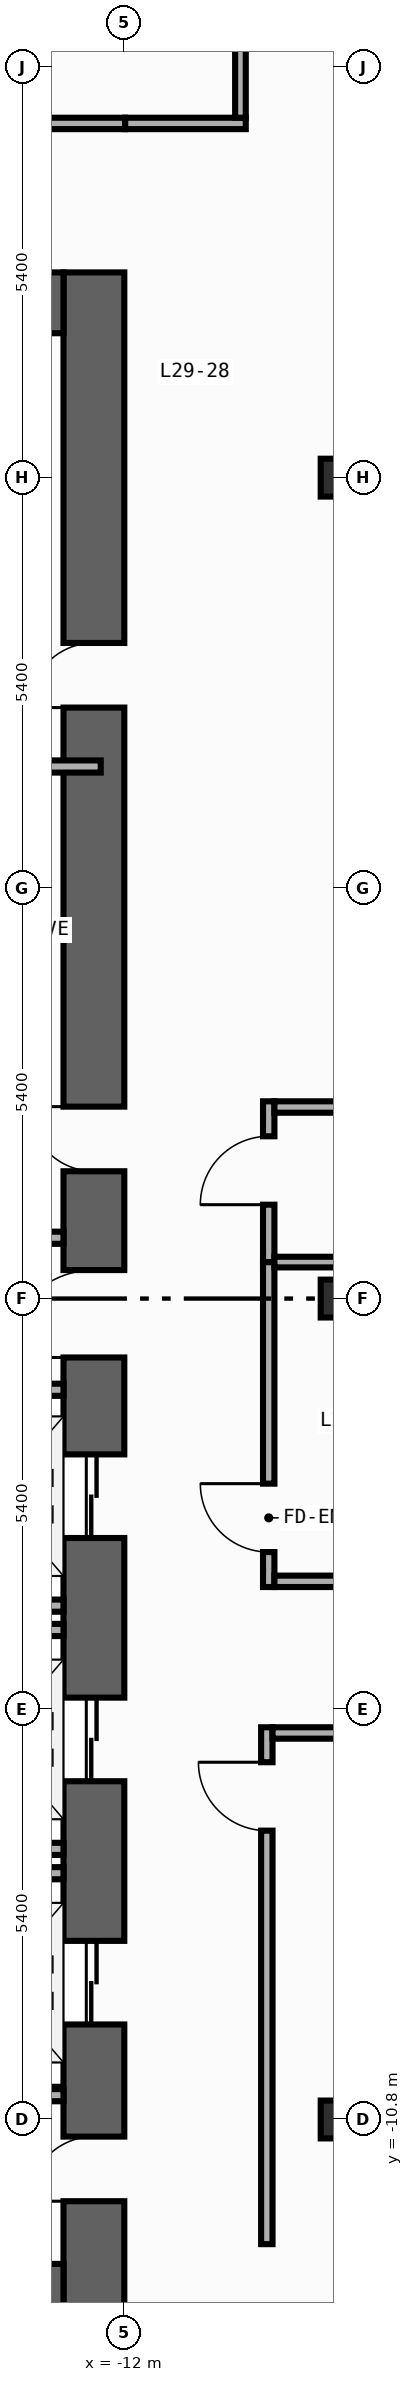
"""IFC4 building model, lengths in metres.
Left out: names, types, materials, properties, quantities, classifications, styles, units other than length and angle.
Written with IfcOpenShell. Run it as: python <this file> out.ifc"""

import sys

from ifc_helpers import new_model, si_unit, direction, frame, frame_2d, origin, origin_2d, place, context, subcontext, project, spatial, rectangle, i_section, extrude, element, fill, save


model = new_model("IFC4")
c1 = context("Model", 3, precision=1e-05, world=origin(), true_north=direction((0.0, 1.0)))
c2 = subcontext(c1, "Body", "Model", "MODEL_VIEW")
j1 = project(units=[si_unit("LENGTHUNIT", "METRE"), si_unit("PLANEANGLEUNIT", "RADIAN")], contexts=[c1])
p1 = place(None, origin())
s1 = spatial("IfcSite", under=j1, at=p1, CompositionType="ELEMENT")
p2 = place(p1, origin())
s2 = spatial("IfcBuilding", under=s1, at=p2, CompositionType="ELEMENT")
p3 = place(p2, frame((0.0, 0.0, 126.8)))
s3 = spatial("IfcBuildingStorey", under=s2, at=p3, CompositionType="ELEMENT", Elevation=126.8)
p4 = place(p3, frame((-12.4, -13.5, 0.0), z_axis=(0.0, 0.0, 1.0), x_axis=(0.0, 1.0, 0.0)))
e1 = element("IfcWall", 1, at=p4, inside=s3, PredefinedType="SHEAR", context=c2, shape_type="SweptSolid", body=[
    extrude(rectangle(XDim=27.0, YDim=0.8, at=frame_2d((13.5, 0.0))), origin(), (0.0, 0.0, 1.0), 3.94),
])
p5 = place(p4, frame((10.35, 0.0, 0.0)))
e2 = element("IfcOpeningElement", 2, at=p5, cuts=e1, PredefinedType="OPENING", context=c2, shape_type="SweptSolid", body=[
    extrude(rectangle(XDim=1.1, YDim=2.2, at=frame_2d((0.55, 1.1))), frame((0.0, 0.41, 0.0), z_axis=(0.0, -1.0, 0.0), x_axis=(1.0, 0.0, 0.0)), (0.0, 0.0, 1.0), 0.82),
])
p6 = place(p4, frame((7.15, 0.0, 0.0)))
e3 = element("IfcOpeningElement", 3, at=p6, cuts=e1, PredefinedType="OPENING", context=c2, shape_type="SweptSolid", body=[
    extrude(rectangle(XDim=1.1, YDim=2.2, at=frame_2d((0.55, 1.1))), frame((0.0, 0.41, 0.0), z_axis=(0.0, -1.0, 0.0), x_axis=(1.0, 0.0, 0.0)), (0.0, 0.0, 1.0), 0.82),
])
p7 = place(p4, frame((3.95, 0.0, 0.0)))
e4 = element("IfcOpeningElement", 4, at=p7, cuts=e1, PredefinedType="OPENING", context=c2, shape_type="SweptSolid", body=[
    extrude(rectangle(XDim=1.1, YDim=2.2, at=frame_2d((0.55, 1.1))), frame((0.0, 0.41, 0.0), z_axis=(0.0, -1.0, 0.0), x_axis=(1.0, 0.0, 0.0)), (0.0, 0.0, 1.0), 0.82),
])
p8 = place(p4, frame((15.175, 0.0, 0.0)))
e5 = element("IfcOpeningElement", 5, at=p8, cuts=e1, PredefinedType="OPENING", context=c2, shape_type="SweptSolid", body=[
    extrude(rectangle(XDim=0.85, YDim=2.1, at=frame_2d((0.425, 1.05))), frame((0.0, 0.41, 0.0), z_axis=(0.0, -1.0, 0.0), x_axis=(1.0, 0.0, 0.0)), (0.0, 0.0, 1.0), 0.82),
])
p9 = place(p4, frame((21.275, 0.0, 0.0)))
e6 = element("IfcOpeningElement", 6, at=p9, cuts=e1, PredefinedType="OPENING", context=c2, shape_type="SweptSolid", body=[
    extrude(rectangle(XDim=0.85, YDim=2.1, at=frame_2d((0.425, 1.05))), frame((0.0, 0.41, 0.0), z_axis=(0.0, -1.0, 0.0), x_axis=(1.0, 0.0, 0.0)), (0.0, 0.0, 1.0), 0.82),
])
p10 = place(p4, frame((12.725, 0.0, 0.0)))
e7 = element("IfcOpeningElement", 7, at=p10, cuts=e1, PredefinedType="OPENING", context=c2, shape_type="SweptSolid", body=[
    extrude(rectangle(XDim=1.15, YDim=2.2, at=frame_2d((0.575, 1.1))), frame((0.0, 0.41, 0.0), z_axis=(0.0, -1.0, 0.0), x_axis=(1.0, 0.0, 0.0)), (0.0, 0.0, 1.0), 0.82),
])
p11 = place(p4, frame((1.625, 0.0, 0.0)))
e8 = element("IfcOpeningElement", 8, at=p11, cuts=e1, PredefinedType="OPENING", context=c2, shape_type="SweptSolid", body=[
    extrude(rectangle(XDim=0.85, YDim=2.1, at=frame_2d((0.425, 1.05))), frame((0.0, 0.41, 0.0), z_axis=(0.0, -1.0, 0.0), x_axis=(1.0, 0.0, 0.0)), (0.0, 0.0, 1.0), 0.82),
])
for number, where, z_axis, x_axis in (
    (9, (-19.6, -13.1, 0.0), (0.0, 0.0, 1.0), (1.0, 0.0, 0.0)),
    (10, (-19.6, 13.1, 0.0), (0.0, 0.0, 1.0), (1.0, 0.0, 0.0)),
):
    element("IfcWall", number, at=place(p3, frame(where, z_axis=z_axis, x_axis=x_axis)), inside=s3, PredefinedType="SHEAR", context=c2, shape_type="SweptSolid", body=[
        extrude(rectangle(XDim=6.8, YDim=0.8, at=frame_2d((3.4, 0.0))), origin(), (0.0, 0.0, 1.0), 3.94),
    ])
for number, where, z_axis, x_axis in (
    (11, (-9.2, -10.8, 0.0), (0.0, 0.0, 1.0), (1.0, 0.0, 0.0)),
    (12, (-9.2, 0.0, 0.0), (0.0, 0.0, 1.0), (1.0, 0.0, 0.0)),
    (13, (-9.2, 10.8, 0.0), (0.0, 0.0, 1.0), (1.0, 0.0, 0.0)),
):
    element("IfcColumn", number, at=place(p3, frame(where, z_axis=z_axis, x_axis=x_axis)), inside=s3, PredefinedType="COLUMN", context=c2, shape_type="SweptSolid", body=[
        extrude(i_section(OverallWidth=0.432, OverallDepth=0.498, WebThickness=0.045, FlangeThickness=0.07, FilletRadius=0.022, at=origin_2d()), origin(), (0.0, 0.0, 1.0), 4.2),
    ])
for number, where, z_axis, x_axis in (
    (14, (-14.99, -4.04, 0.0), (0.0, 0.0, 1.0), (1.0, 0.0, 0.0)),
    (15, (-14.99, -7.24, 0.0), (0.0, 0.0, 1.0), (1.0, 0.0, 0.0)),
    (16, (-14.99, -4.36, 0.0), (0.0, 0.0, 1.0), (1.0, 0.0, 0.0)),
    (17, (-14.99, -7.56, 0.0), (0.0, 0.0, 1.0), (1.0, 0.0, 0.0)),
):
    element("IfcWall", number, at=place(p3, frame(where, z_axis=z_axis, x_axis=x_axis)), inside=s3, PredefinedType="STANDARD", context=c2, shape_type="SweptSolid", body=[
        extrude(rectangle(XDim=2.19, YDim=0.16, at=frame_2d((1.095, 0.0))), origin(), (0.0, 0.0, 1.0), 3.94),
    ])
for number, where, z_axis, x_axis in (
    (18, (-15.4, 0.8, 0.0), (0.0, 0.0, 1.0), (1.0, 0.0, 0.0)),
    (19, (-15.4, -1.2, 0.0), (0.0, 0.0, 1.0), (1.0, 0.0, 0.0)),
    (20, (-15.4, -10.48, 0.0), (0.0, 0.0, 1.0), (1.0, 0.0, 0.0)),
):
    element("IfcWall", number, at=place(p3, frame(where, z_axis=z_axis, x_axis=x_axis)), inside=s3, PredefinedType="STANDARD", context=c2, shape_type="SweptSolid", body=[
        extrude(rectangle(XDim=2.6, YDim=0.16, at=frame_2d((1.3, 0.0))), origin(), (0.0, 0.0, 1.0), 3.94),
    ])
p12 = place(p3, frame((-15.375, 7.0, 0.0), z_axis=(0.0, 0.0, 1.0), x_axis=(1.0, 0.0, 0.0)))
e21 = element("IfcWall", 21, at=p12, inside=s3, PredefinedType="PARTITIONING", context=c2, shape_type="SweptSolid", body=[
    extrude(rectangle(XDim=3.065, YDim=0.16, at=frame_2d((1.532, 0.0))), origin(), (0.0, 0.0, 1.0), 3.94),
])
p13 = place(p3, frame((-11.99, 15.46, 0.0), z_axis=(0.0, 0.0, 1.0), x_axis=(1.0, 0.0, 0.0)))
e22 = element("IfcWall", 22, at=p13, inside=s3, PredefinedType="PARTITIONING", context=c2, shape_type="SweptSolid", body=[
    extrude(rectangle(XDim=1.588, YDim=0.15, at=frame_2d((0.794, 0.0))), origin(), (0.0, 0.0, 1.0), 3.94),
])
p14 = place(p3, frame((-10.1, -3.795, 0.0), z_axis=(0.0, 0.0, 1.0), x_axis=(0.0, 1.0, 0.0)))
e23 = element("IfcWall", 23, at=p14, inside=s3, PredefinedType="PARTITIONING", context=c2, shape_type="SweptSolid", body=[
    extrude(rectangle(XDim=4.275, YDim=0.15, at=frame_2d((2.137, 0.0))), origin(), (0.0, 0.0, 1.0), 3.94),
])
p15 = place(p14, frame((0.46, 0.0, 0.0)))
e24 = element("IfcOpeningElement", 24, at=p15, cuts=e23, PredefinedType="OPENING", context=c2, shape_type="SweptSolid", body=[
    extrude(rectangle(XDim=0.9, YDim=2.15, at=frame_2d((0.45, 1.075))), frame((0.0, 0.085, 0.0), z_axis=(0.0, -1.0, 0.0), x_axis=(1.0, 0.0, 0.0)), (0.0, 0.0, 1.0), 0.17),
])
p16 = place(p3, frame((-10.1, 0.48, 0.0), z_axis=(0.0, 0.0, 1.0), x_axis=(0.0, 1.0, 0.0)))
e25 = element("IfcWall", 25, at=p16, inside=s3, PredefinedType="PARTITIONING", context=c2, shape_type="SweptSolid", body=[
    extrude(rectangle(XDim=2.115, YDim=0.15, at=frame_2d((1.058, 0.0))), origin(), (0.0, 0.0, 1.0), 3.94),
])
p17 = place(p16, frame((0.755, 0.0, 0.0)))
e26 = element("IfcOpeningElement", 26, at=p17, cuts=e25, PredefinedType="OPENING", context=c2, shape_type="SweptSolid", body=[
    extrude(rectangle(XDim=0.9, YDim=2.15, at=frame_2d((0.45, 1.075))), frame((0.0, 0.085, 0.0), z_axis=(0.0, -1.0, 0.0), x_axis=(1.0, 0.0, 0.0)), (0.0, 0.0, 1.0), 0.17),
])
p18 = place(p3, frame((-10.125, -12.44, 0.0), z_axis=(0.0, 0.0, 1.0), x_axis=(0.0, 1.0, 0.0)))
e27 = element("IfcWall", 27, at=p18, inside=s3, PredefinedType="PARTITIONING", context=c2, shape_type="SweptSolid", body=[
    extrude(rectangle(XDim=6.8, YDim=0.15, at=frame_2d((3.4, 0.0))), origin(), (0.0, 0.0, 1.0), 3.94),
])
p19 = place(p18, frame((5.44, 0.0, 0.0)))
e28 = element("IfcOpeningElement", 28, at=p19, cuts=e27, PredefinedType="OPENING", context=c2, shape_type="SweptSolid", body=[
    extrude(rectangle(XDim=0.9, YDim=2.15, at=frame_2d((0.45, 1.075))), frame((0.0, 0.085, 0.0), z_axis=(0.0, -1.0, 0.0), x_axis=(1.0, 0.0, 0.0)), (0.0, 0.0, 1.0), 0.17),
])
p20 = place(p3, frame((-10.025, 2.52, 0.0), z_axis=(0.0, 0.0, 1.0), x_axis=(1.0, 0.0, 0.0)))
e29 = element("IfcWall", 29, at=p20, inside=s3, PredefinedType="PARTITIONING", context=c2, shape_type="SweptSolid", body=[
    extrude(rectangle(XDim=14.22, YDim=0.15, at=frame_2d((7.11, 0.0))), origin(), (0.0, 0.0, 1.0), 3.94),
])
p21 = place(p20, frame((9.607, 0.0, 0.0)))
e30 = element("IfcOpeningElement", 30, at=p21, cuts=e29, PredefinedType="OPENING", context=c2, shape_type="SweptSolid", body=[
    extrude(rectangle(XDim=0.9, YDim=2.15, at=frame_2d((0.45, 1.075))), frame((0.0, 0.085, 0.0), z_axis=(0.0, -1.0, 0.0), x_axis=(1.0, 0.0, 0.0)), (0.0, 0.0, 1.0), 0.17),
])
p22 = place(p3, frame((-10.025, -3.72, 0.0), z_axis=(0.0, 0.0, 1.0), x_axis=(1.0, 0.0, 0.0)))
e31 = element("IfcWall", 31, at=p22, inside=s3, PredefinedType="PARTITIONING", context=c2, shape_type="SweptSolid", body=[
    extrude(rectangle(XDim=4.465, YDim=0.15, at=frame_2d((2.232, 0.0))), origin(), (0.0, 0.0, 1.0), 3.94),
])
p23 = place(p22, frame((3.105, 0.0, 0.0)))
e32 = element("IfcOpeningElement", 32, at=p23, cuts=e31, PredefinedType="OPENING", context=c2, shape_type="SweptSolid", body=[
    extrude(rectangle(XDim=0.9, YDim=2.15, at=frame_2d((0.45, 1.075))), frame((0.0, 0.085, 0.0), z_axis=(0.0, -1.0, 0.0), x_axis=(1.0, 0.0, 0.0)), (0.0, 0.0, 1.0), 0.17),
])
p24 = place(p3, frame((-10.05, -5.715, 0.0), z_axis=(0.0, 0.0, 1.0), x_axis=(1.0, 0.0, 0.0)))
e33 = element("IfcWall", 33, at=p24, inside=s3, PredefinedType="PARTITIONING", context=c2, shape_type="SweptSolid", body=[
    extrude(rectangle(XDim=8.265, YDim=0.15, at=frame_2d((4.133, 0.0))), origin(), (0.0, 0.0, 1.0), 3.94),
])
p25 = place(p24, frame((6.905, 0.0, 0.0)))
e34 = element("IfcOpeningElement", 34, at=p25, cuts=e33, PredefinedType="OPENING", context=c2, shape_type="SweptSolid", body=[
    extrude(rectangle(XDim=0.9, YDim=2.15, at=frame_2d((0.45, 1.075))), frame((0.0, 0.085, 0.0), z_axis=(0.0, -1.0, 0.0), x_axis=(1.0, 0.0, 0.0)), (0.0, 0.0, 1.0), 0.17),
])
p26 = place(p3, frame((-20.64, 15.46, 0.0), z_axis=(0.0, 0.0, 1.0), x_axis=(1.0, 0.0, 0.0)))
e35 = element("IfcWall", 35, at=p26, inside=s3, PredefinedType="PARTITIONING", context=c2, shape_type="SweptSolid", body=[
    extrude(rectangle(XDim=8.65, YDim=0.15, at=frame_2d((4.325, 0.0))), origin(), (0.0, 0.0, 1.0), 3.94),
])
p27 = place(p26, frame((2.871, 0.0, 0.0)))
e36 = element("IfcOpeningElement", 36, at=p27, cuts=e35, PredefinedType="OPENING", context=c2, shape_type="SweptSolid", body=[
    extrude(rectangle(XDim=0.9, YDim=2.15, at=frame_2d((0.45, 1.075))), frame((0.0, 0.085, 0.0), z_axis=(0.0, -1.0, 0.0), x_axis=(1.0, 0.0, 0.0)), (0.0, 0.0, 1.0), 0.17),
])
p28 = place(p3, frame((-10.472, 15.535, 0.0), z_axis=(0.0, 0.0, 1.0), x_axis=(0.0, 1.0, 0.0)))
e37 = element("IfcWall", 37, at=p28, inside=s3, PredefinedType="PARTITIONING", context=c2, shape_type="SweptSolid", body=[
    extrude(rectangle(XDim=10.62, YDim=0.14, at=frame_2d((5.31, 0.0))), origin(), (0.0, 0.0, 1.0), 3.94),
])
p29 = place(p28, frame((6.695, 0.0, 0.0)))
e38 = element("IfcOpeningElement", 38, at=p29, cuts=e37, PredefinedType="OPENING", context=c2, shape_type="SweptSolid", body=[
    extrude(rectangle(XDim=0.85, YDim=2.1, at=frame_2d((0.425, 1.05))), frame((0.0, 0.08, 0.0), z_axis=(0.0, -1.0, 0.0), x_axis=(1.0, 0.0, 0.0)), (0.0, 0.0, 1.0), 0.16),
])
p30 = place(p3, frame((-10.025, 0.48, 0.0), z_axis=(0.0, 0.0, 1.0), x_axis=(1.0, 0.0, 0.0)))
e39 = element("IfcWall", 39, at=p30, inside=s3, PredefinedType="PARTITIONING", context=c2, shape_type="SweptSolid", body=[
    extrude(rectangle(XDim=4.465, YDim=0.14, at=frame_2d((2.232, 0.0))), origin(), (0.0, 0.0, 1.0), 3.94),
])
p31 = place(p5, origin())
e40 = element("IfcDoor", 40, at=p31, inside=s3, OperationType="DOUBLE_DOOR_SLIDING", PredefinedType="DOOR", context=c2, shape_type="SweptSolid", body=[
    extrude(rectangle(XDim=1.1, YDim=2.2, at=frame_2d((0.55, 1.1))), frame((0.0, 0.025, 0.0), z_axis=(0.0, -1.0, 0.0), x_axis=(1.0, 0.0, 0.0)), (0.0, 0.0, 1.0), 0.05),
])
fill(e2, e40)
p32 = place(p6, origin())
e41 = element("IfcDoor", 41, at=p32, inside=s3, OperationType="DOUBLE_DOOR_SLIDING", PredefinedType="DOOR", context=c2, shape_type="SweptSolid", body=[
    extrude(rectangle(XDim=1.1, YDim=2.2, at=frame_2d((0.55, 1.1))), frame((0.0, 0.025, 0.0), z_axis=(0.0, -1.0, 0.0), x_axis=(1.0, 0.0, 0.0)), (0.0, 0.0, 1.0), 0.05),
])
fill(e3, e41)
p33 = place(p7, origin())
e42 = element("IfcDoor", 42, at=p33, inside=s3, OperationType="DOUBLE_DOOR_SLIDING", PredefinedType="DOOR", context=c2, shape_type="SweptSolid", body=[
    extrude(rectangle(XDim=1.1, YDim=2.2, at=frame_2d((0.55, 1.1))), frame((0.0, 0.025, 0.0), z_axis=(0.0, -1.0, 0.0), x_axis=(1.0, 0.0, 0.0)), (0.0, 0.0, 1.0), 0.05),
])
fill(e4, e42)
p34 = place(p8, origin())
e43 = element("IfcDoor", 43, at=p34, inside=s3, OperationType="SINGLE_SWING_RIGHT", PredefinedType="DOOR", context=c2, shape_type="SweptSolid", body=[
    extrude(rectangle(XDim=0.85, YDim=2.1, at=frame_2d((0.425, 1.05))), frame((0.0, 0.025, 0.0), z_axis=(0.0, -1.0, 0.0), x_axis=(1.0, 0.0, 0.0)), (0.0, 0.0, 1.0), 0.05),
])
fill(e5, e43)
p35 = place(p9, origin())
e44 = element("IfcDoor", 44, at=p35, inside=s3, OperationType="SINGLE_SWING_LEFT", PredefinedType="DOOR", context=c2, shape_type="SweptSolid", body=[
    extrude(rectangle(XDim=0.85, YDim=2.1, at=frame_2d((0.425, 1.05))), frame((0.0, 0.025, 0.0), z_axis=(0.0, -1.0, 0.0), x_axis=(1.0, 0.0, 0.0)), (0.0, 0.0, 1.0), 0.05),
])
fill(e6, e44)
p36 = place(p10, origin())
e45 = element("IfcDoor", 45, at=p36, inside=s3, OperationType="SINGLE_SWING_LEFT", PredefinedType="DOOR", context=c2, shape_type="SweptSolid", body=[
    extrude(rectangle(XDim=1.15, YDim=2.2, at=frame_2d((0.575, 1.1))), frame((0.0, 0.025, 0.0), z_axis=(0.0, -1.0, 0.0), x_axis=(1.0, 0.0, 0.0)), (0.0, 0.0, 1.0), 0.05),
])
fill(e7, e45)
p37 = place(p11, origin())
e46 = element("IfcDoor", 46, at=p37, inside=s3, OperationType="SINGLE_SWING_LEFT", PredefinedType="DOOR", context=c2, shape_type="SweptSolid", body=[
    extrude(rectangle(XDim=0.85, YDim=2.1, at=frame_2d((0.425, 1.05))), frame((0.0, 0.025, 0.0), z_axis=(0.0, -1.0, 0.0), x_axis=(1.0, 0.0, 0.0)), (0.0, 0.0, 1.0), 0.05),
])
fill(e8, e46)
p38 = place(p15, origin())
e47 = element("IfcDoor", 47, at=p38, inside=s3, OperationType="SINGLE_SWING_RIGHT", PredefinedType="DOOR", context=c2, shape_type="SweptSolid", body=[
    extrude(rectangle(XDim=0.9, YDim=2.15, at=frame_2d((0.45, 1.075))), frame((0.0, 0.025, 0.0), z_axis=(0.0, -1.0, 0.0), x_axis=(1.0, 0.0, 0.0)), (0.0, 0.0, 1.0), 0.05),
])
fill(e24, e47)
p39 = place(p17, origin())
e48 = element("IfcDoor", 48, at=p39, inside=s3, OperationType="SINGLE_SWING_LEFT", PredefinedType="DOOR", context=c2, shape_type="SweptSolid", body=[
    extrude(rectangle(XDim=0.9, YDim=2.15, at=frame_2d((0.45, 1.075))), frame((0.0, 0.025, 0.0), z_axis=(0.0, -1.0, 0.0), x_axis=(1.0, 0.0, 0.0)), (0.0, 0.0, 1.0), 0.05),
])
fill(e26, e48)
p40 = place(p19, origin())
e49 = element("IfcDoor", 49, at=p40, inside=s3, OperationType="SINGLE_SWING_RIGHT", PredefinedType="DOOR", context=c2, shape_type="SweptSolid", body=[
    extrude(rectangle(XDim=0.9, YDim=2.15, at=frame_2d((0.45, 1.075))), frame((0.0, 0.025, 0.0), z_axis=(0.0, -1.0, 0.0), x_axis=(1.0, 0.0, 0.0)), (0.0, 0.0, 1.0), 0.05),
])
fill(e28, e49)
save(model, sys.argv[1])
